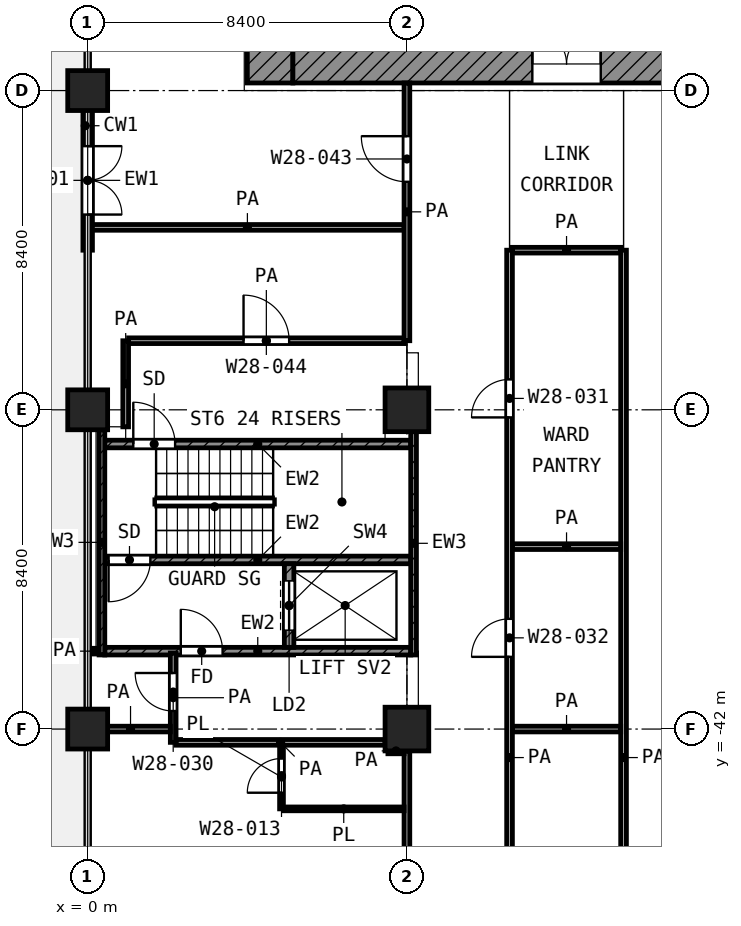
"""IFC4 building model, lengths in metres.
Left out: names, types, materials, properties, quantities, classifications, styles, units other than length and angle.
Written with IfcOpenShell. Run it as: python <this file> out.ifc"""

import sys

from ifc_helpers import new_model, si_unit, direction, frame, frame_2d, origin, origin_2d, place, context, subcontext, project, spatial, rectangle, extrude, element, fill, save


model = new_model("IFC4")
c1 = context("Model", 3, precision=1e-05, world=origin(), true_north=direction((0.0, 1.0)))
c2 = subcontext(c1, "Body", "Model", "MODEL_VIEW")
j1 = project(units=[si_unit("LENGTHUNIT", "METRE"), si_unit("PLANEANGLEUNIT", "RADIAN")], contexts=[c1])
p1 = place(None, origin())
s1 = spatial("IfcSite", under=j1, at=p1, CompositionType="ELEMENT")
p2 = place(p1, origin())
s2 = spatial("IfcBuilding", under=s1, at=p2, CompositionType="ELEMENT")
p3 = place(p2, frame((0.0, 0.0, 145.0)))
s3 = spatial("IfcBuildingStorey", under=s2, at=p3, CompositionType="ELEMENT", Elevation=145.0)
for number, where, z_axis, x_axis in (
    (1, (0.0, -25.2, 0.0), (0.0, 0.0, 1.0), (1.0, 0.0, 0.0)),
    (2, (0.0, -33.6, 0.0), (0.0, 0.0, 1.0), (1.0, 0.0, 0.0)),
):
    element("IfcColumn", number, at=place(p3, frame(where, z_axis=z_axis, x_axis=x_axis)), inside=s3, PredefinedType="COLUMN", context=c2, shape_type="SweptSolid", body=[
        extrude(rectangle(XDim=1.05, YDim=1.05, at=origin_2d()), origin(), (0.0, 0.0, 1.0), 4.2),
    ])
p4 = place(p3, frame((8.4, -33.6, 0.0), z_axis=(0.0, 0.0, 1.0), x_axis=(1.0, 0.0, 0.0)))
e3 = element("IfcColumn", 3, at=p4, inside=s3, PredefinedType="COLUMN", context=c2, shape_type="SweptSolid", body=[
    extrude(rectangle(XDim=1.15, YDim=1.15, at=origin_2d()), origin(), (0.0, 0.0, 1.0), 4.2),
])
p5 = place(p3, frame((0.0, -42.0, 0.0), z_axis=(0.0, 0.0, 1.0), x_axis=(1.0, 0.0, 0.0)))
e4 = element("IfcColumn", 4, at=p5, inside=s3, PredefinedType="COLUMN", context=c2, shape_type="SweptSolid", body=[
    extrude(rectangle(XDim=1.05, YDim=1.05, at=origin_2d()), origin(), (0.0, 0.0, 1.0), 4.2),
])
p6 = place(p3, frame((8.4, -42.0, 0.0), z_axis=(0.0, 0.0, 1.0), x_axis=(1.0, 0.0, 0.0)))
e5 = element("IfcColumn", 5, at=p6, inside=s3, PredefinedType="COLUMN", context=c2, shape_type="SweptSolid", body=[
    extrude(rectangle(XDim=1.15, YDim=1.15, at=origin_2d()), origin(), (0.0, 0.0, 1.0), 4.2),
])
p7 = place(p3, frame((0.0, -25.725, 0.0), z_axis=(0.0, 0.0, 1.0), x_axis=(0.0, -1.0, 0.0)))
e6 = element("IfcWall", 6, at=p7, inside=s3, PredefinedType="SOLIDWALL", context=c2, shape_type="SweptSolid", body=[
    extrude(rectangle(XDim=3.675, YDim=0.25, at=frame_2d((1.837, 0.0))), origin(), (0.0, 0.0, 1.0), 3.48),
])
p8 = place(p7, frame((0.938, 0.0, 0.0)))
e7 = element("IfcOpeningElement", 7, at=p8, cuts=e6, PredefinedType="OPENING", context=c2, shape_type="SweptSolid", body=[
    extrude(rectangle(XDim=1.8, YDim=2.1, at=frame_2d((0.9, 1.05))), frame((0.0, 0.135, 0.0), z_axis=(0.0, -1.0, 0.0), x_axis=(1.0, 0.0, 0.0)), (0.0, 0.0, 1.0), 0.27),
])
p9 = place(p3, frame((4.8, -25.0, 0.0), z_axis=(0.0, 0.0, 1.0), x_axis=(0.0, 1.0, 0.0)))
e8 = element("IfcWall", 8, at=p9, inside=s3, PredefinedType="SHEAR", context=c2, shape_type="SweptSolid", body=[
    extrude(rectangle(XDim=19.6, YDim=1.2, at=frame_2d((9.8, 0.0))), origin(), (0.0, 0.0, 1.0), 3.6),
])
p10 = place(p9, frame((11.45, 0.0, 0.0)))
e9 = element("IfcOpeningElement", 9, at=p10, cuts=e8, PredefinedType="OPENING", context=c2, shape_type="SweptSolid", body=[
    extrude(rectangle(XDim=1.1, YDim=2.1, at=frame_2d((0.55, 1.05))), frame((0.0, 0.61, 0.0), z_axis=(0.0, -1.0, 0.0), x_axis=(1.0, 0.0, 0.0)), (0.0, 0.0, 1.0), 1.22),
])
p11 = place(p9, frame((2.15, 0.0, 0.0)))
e10 = element("IfcOpeningElement", 10, at=p11, cuts=e8, PredefinedType="OPENING", context=c2, shape_type="SweptSolid", body=[
    extrude(rectangle(XDim=1.1, YDim=2.1, at=frame_2d((0.55, 1.05))), frame((0.0, 0.61, 0.0), z_axis=(0.0, -1.0, 0.0), x_axis=(1.0, 0.0, 0.0)), (0.0, 0.0, 1.0), 1.22),
])
p12 = place(p3, frame((5.4, -24.5, 0.0), z_axis=(0.0, 0.0, 1.0), x_axis=(1.0, 0.0, 0.0)))
e11 = element("IfcWall", 11, at=p12, inside=s3, PredefinedType="SHEAR", context=c2, shape_type="SweptSolid", body=[
    extrude(rectangle(XDim=18.6, YDim=1.0, at=frame_2d((9.3, 0.0))), origin(), (0.0, 0.0, 1.0), 3.6),
])
p13 = place(p12, frame((6.3, 0.0, 0.0)))
e12 = element("IfcOpeningElement", 12, at=p13, cuts=e11, PredefinedType="OPENING", context=c2, shape_type="SweptSolid", body=[
    extrude(rectangle(XDim=1.8, YDim=2.1, at=frame_2d((0.9, 1.05))), frame((0.0, 0.51, 0.0), z_axis=(0.0, -1.0, 0.0), x_axis=(1.0, 0.0, 0.0)), (0.0, 0.0, 1.0), 1.02),
])
p14 = place(p3, frame((0.375, -40.05, 0.0), z_axis=(0.0, 0.0, 1.0), x_axis=(0.0, 1.0, 0.0)))
e13 = element("IfcWall", 13, at=p14, inside=s3, PredefinedType="SHEAR", context=c2, shape_type="SweptSolid", body=[
    extrude(rectangle(XDim=5.925, YDim=0.15, at=frame_2d((2.962, 0.0))), origin(), (0.0, 0.0, 1.0), 3.6),
])
p15 = place(p3, frame((8.575, -40.05, 0.0), z_axis=(0.0, 0.0, 1.0), x_axis=(0.0, 1.0, 0.0)))
e14 = element("IfcWall", 14, at=p15, inside=s3, PredefinedType="SHEAR", context=c2, shape_type="SweptSolid", body=[
    extrude(rectangle(XDim=5.875, YDim=0.15, at=frame_2d((2.938, 0.0))), origin(), (0.0, 0.0, 1.0), 3.6),
])
p16 = place(p3, frame((0.45, -34.5, 0.0), z_axis=(0.0, 0.0, 1.0), x_axis=(1.0, 0.0, 0.0)))
e15 = element("IfcWall", 15, at=p16, inside=s3, PredefinedType="SHEAR", context=c2, shape_type="SweptSolid", body=[
    extrude(rectangle(XDim=8.05, YDim=0.2, at=frame_2d((4.025, 0.0))), origin(), (0.0, 0.0, 1.0), 3.6),
])
p17 = place(p16, frame((0.75, 0.0, 0.0)))
e16 = element("IfcOpeningElement", 16, at=p17, cuts=e15, PredefinedType="OPENING", context=c2, shape_type="SweptSolid", body=[
    extrude(rectangle(XDim=1.1, YDim=2.1, at=frame_2d((0.55, 1.05))), frame((0.0, 0.11, 0.0), z_axis=(0.0, -1.0, 0.0), x_axis=(1.0, 0.0, 0.0)), (0.0, 0.0, 1.0), 0.22),
])
p18 = place(p3, frame((0.45, -37.55, 0.0), z_axis=(0.0, 0.0, 1.0), x_axis=(1.0, 0.0, 0.0)))
e17 = element("IfcWall", 17, at=p18, inside=s3, PredefinedType="SHEAR", context=c2, shape_type="SweptSolid", body=[
    extrude(rectangle(XDim=8.05, YDim=0.2, at=frame_2d((4.025, 0.0))), origin(), (0.0, 0.0, 1.0), 3.6),
])
p19 = place(p18, frame((0.1, 0.0, 0.0)))
e18 = element("IfcOpeningElement", 18, at=p19, cuts=e17, PredefinedType="OPENING", context=c2, shape_type="SweptSolid", body=[
    extrude(rectangle(XDim=1.1, YDim=2.1, at=frame_2d((0.55, 1.05))), frame((0.0, 0.11, 0.0), z_axis=(0.0, -1.0, 0.0), x_axis=(1.0, 0.0, 0.0)), (0.0, 0.0, 1.0), 0.22),
])
p20 = place(p3, frame((0.45, -39.95, 0.0), z_axis=(0.0, 0.0, 1.0), x_axis=(1.0, 0.0, 0.0)))
e19 = element("IfcWall", 19, at=p20, inside=s3, PredefinedType="SHEAR", context=c2, shape_type="SweptSolid", body=[
    extrude(rectangle(XDim=8.05, YDim=0.2, at=frame_2d((4.025, 0.0))), origin(), (0.0, 0.0, 1.0), 3.6),
])
p21 = place(p20, frame((2.0, 0.0, 0.0)))
e20 = element("IfcOpeningElement", 20, at=p21, cuts=e19, PredefinedType="OPENING", context=c2, shape_type="SweptSolid", body=[
    extrude(rectangle(XDim=1.1, YDim=2.1, at=frame_2d((0.55, 1.05))), frame((0.0, 0.11, 0.0), z_axis=(0.0, -1.0, 0.0), x_axis=(1.0, 0.0, 0.0)), (0.0, 0.0, 1.0), 0.22),
])
p22 = place(p3, frame((5.3, -39.85, 0.0), z_axis=(0.0, 0.0, 1.0), x_axis=(0.0, 1.0, 0.0)))
e21 = element("IfcWall", 21, at=p22, inside=s3, PredefinedType="SHEAR", context=c2, shape_type="SweptSolid", body=[
    extrude(rectangle(XDim=2.2, YDim=0.25, at=frame_2d((1.1, 0.0))), origin(), (0.0, 0.0, 1.0), 3.6),
])
p23 = place(p22, frame((0.45, 0.0, 0.0)))
e22 = element("IfcOpeningElement", 22, at=p23, cuts=e21, PredefinedType="OPENING", context=c2, shape_type="SweptSolid", body=[
    extrude(rectangle(XDim=1.3, YDim=2.1, at=frame_2d((0.65, 1.05))), frame((0.0, 0.135, 0.0), z_axis=(0.0, -1.0, 0.0), x_axis=(1.0, 0.0, 0.0)), (0.0, 0.0, 1.0), 0.27),
])
p24 = place(p3, frame((5.15, -44.1, 0.0), z_axis=(0.0, 0.0, 1.0), x_axis=(1.0, 0.0, 0.0)))
e23 = element("IfcWall", 23, at=p24, inside=s3, PredefinedType="PARTITIONING", context=c2, shape_type="SweptSolid", body=[
    extrude(rectangle(XDim=3.175, YDim=0.1, at=frame_2d((1.587, 0.0))), origin(), (0.0, 0.0, 1.0), 3.6),
])
p25 = place(p3, frame((5.1, -44.1, 0.0), z_axis=(0.0, 0.0, 1.0), x_axis=(0.0, 1.0, 0.0)))
e24 = element("IfcWall", 24, at=p25, inside=s3, PredefinedType="PARTITIONING", context=c2, shape_type="SweptSolid", body=[
    extrude(rectangle(XDim=1.675, YDim=0.1, at=frame_2d((0.837, 0.0))), origin(), (0.0, 0.0, 1.0), 3.6),
])
p26 = place(p25, frame((0.425, 0.0, 0.0)))
e25 = element("IfcOpeningElement", 25, at=p26, cuts=e24, PredefinedType="OPENING", context=c2, shape_type="SweptSolid", body=[
    extrude(rectangle(XDim=0.9, YDim=2.1, at=frame_2d((0.45, 1.05))), frame((0.0, 0.06, 0.0), z_axis=(0.0, -1.0, 0.0), x_axis=(1.0, 0.0, 0.0)), (0.0, 0.0, 1.0), 0.12),
])
p27 = place(p3, frame((7.9, -42.575, 0.0), z_axis=(0.0, 0.0, 1.0), x_axis=(1.0, 0.0, 0.0)))
e26 = element("IfcWall", 26, at=p27, inside=s3, PredefinedType="PARTITIONING", context=c2, shape_type="SweptSolid", body=[
    extrude(rectangle(XDim=0.425, YDim=0.15, at=frame_2d((0.212, 0.0))), origin(), (0.0, 0.0, 1.0), 3.6),
])
p28 = place(p3, frame((2.325, -42.35, 0.0), z_axis=(0.0, 0.0, 1.0), x_axis=(1.0, 0.0, 0.0)))
e27 = element("IfcWall", 27, at=p28, inside=s3, PredefinedType="PARTITIONING", context=c2, shape_type="SweptSolid", body=[
    extrude(rectangle(XDim=5.498, YDim=0.15, at=frame_2d((2.749, 0.0))), origin(), (0.0, 0.0, 1.0), 3.6),
])
p29 = place(p3, frame((0.08, -42.0, 0.0), z_axis=(0.0, 0.0, 1.0), x_axis=(1.0, 0.0, 0.0)))
e28 = element("IfcWall", 28, at=p29, inside=s3, PredefinedType="PARTITIONING", context=c2, shape_type="SweptSolid", body=[
    extrude(rectangle(XDim=2.095, YDim=0.15, at=frame_2d((1.047, 0.0))), origin(), (0.0, 0.0, 1.0), 3.6),
])
p30 = place(p3, frame((11.175, -42.0, 0.0), z_axis=(0.0, 0.0, 1.0), x_axis=(1.0, 0.0, 0.0)))
e29 = element("IfcWall", 29, at=p30, inside=s3, PredefinedType="PARTITIONING", context=c2, shape_type="SweptSolid", body=[
    extrude(rectangle(XDim=2.85, YDim=0.15, at=frame_2d((1.425, 0.0))), origin(), (0.0, 0.0, 1.0), 3.6),
])
p31 = place(p3, frame((0.08, -39.95, 0.0), z_axis=(0.0, 0.0, 1.0), x_axis=(1.0, 0.0, 0.0)))
e30 = element("IfcWall", 30, at=p31, inside=s3, PredefinedType="PARTITIONING", context=c2, shape_type="SweptSolid", body=[
    extrude(rectangle(XDim=0.19, YDim=0.15, at=frame_2d((0.095, 0.0))), origin(), (0.0, 0.0, 1.0), 3.6),
])
p32 = place(p3, frame((11.175, -37.2, 0.0), z_axis=(0.0, 0.0, 1.0), x_axis=(1.0, 0.0, 0.0)))
e31 = element("IfcWall", 31, at=p32, inside=s3, PredefinedType="PARTITIONING", context=c2, shape_type="SweptSolid", body=[
    extrude(rectangle(XDim=2.85, YDim=0.15, at=frame_2d((1.425, 0.0))), origin(), (0.0, 0.0, 1.0), 3.6),
])
p33 = place(p3, frame((1.077, -31.782, 0.0), z_axis=(0.0, 0.0, 1.0), x_axis=(1.0, 0.0, 0.0)))
e32 = element("IfcWall", 32, at=p33, inside=s3, PredefinedType="PARTITIONING", context=c2, shape_type="SweptSolid", body=[
    extrude(rectangle(XDim=7.248, YDim=0.15, at=frame_2d((3.624, 0.0))), origin(), (0.0, 0.0, 1.0), 3.6),
])
p34 = place(p33, frame((3.024, 0.0, 0.0)))
e33 = element("IfcOpeningElement", 33, at=p34, cuts=e32, PredefinedType="OPENING", context=c2, shape_type="SweptSolid", body=[
    extrude(rectangle(XDim=1.2, YDim=2.1, at=frame_2d((0.6, 1.05))), frame((0.0, 0.085, 0.0), z_axis=(0.0, -1.0, 0.0), x_axis=(1.0, 0.0, 0.0)), (0.0, 0.0, 1.0), 0.17),
])
p35 = place(p3, frame((11.175, -29.4, 0.0), z_axis=(0.0, 0.0, 1.0), x_axis=(1.0, 0.0, 0.0)))
e34 = element("IfcWall", 34, at=p35, inside=s3, PredefinedType="PARTITIONING", context=c2, shape_type="SweptSolid", body=[
    extrude(rectangle(XDim=2.85, YDim=0.15, at=frame_2d((1.425, 0.0))), origin(), (0.0, 0.0, 1.0), 3.6),
])
p36 = place(p3, frame((0.08, -28.8, 0.0), z_axis=(0.0, 0.0, 1.0), x_axis=(1.0, 0.0, 0.0)))
e35 = element("IfcWall", 35, at=p36, inside=s3, PredefinedType="PARTITIONING", context=c2, shape_type="SweptSolid", body=[
    extrude(rectangle(XDim=8.245, YDim=0.15, at=frame_2d((4.123, 0.0))), origin(), (0.0, 0.0, 1.0), 3.6),
])
p37 = place(p3, frame((1.0, -34.048, 0.0), z_axis=(0.0, 0.0, 1.0), x_axis=(0.0, 1.0, 0.0)))
e36 = element("IfcWall", 36, at=p37, inside=s3, PredefinedType="PARTITIONING", context=c2, shape_type="SweptSolid", body=[
    extrude(rectangle(XDim=2.265, YDim=0.15, at=frame_2d((1.133, 0.0))), origin(), (0.0, 0.0, 1.0), 3.6),
])
p38 = place(p3, frame((2.25, -42.35, 0.0), z_axis=(0.0, 0.0, 1.0), x_axis=(0.0, 1.0, 0.0)))
e37 = element("IfcWall", 37, at=p38, inside=s3, PredefinedType="PARTITIONING", context=c2, shape_type="SweptSolid", body=[
    extrude(rectangle(XDim=2.35, YDim=0.15, at=frame_2d((1.175, 0.0))), origin(), (0.0, 0.0, 1.0), 3.6),
])
p39 = place(p38, frame((0.825, 0.0, 0.0)))
e38 = element("IfcOpeningElement", 38, at=p39, cuts=e37, PredefinedType="OPENING", context=c2, shape_type="SweptSolid", body=[
    extrude(rectangle(XDim=1.0, YDim=2.1, at=frame_2d((0.5, 1.05))), frame((0.0, 0.085, 0.0), z_axis=(0.0, -1.0, 0.0), x_axis=(1.0, 0.0, 0.0)), (0.0, 0.0, 1.0), 0.17),
])
p40 = place(p3, frame((8.4, -58.72, 0.0), z_axis=(0.0, 0.0, 1.0), x_axis=(0.0, 1.0, 0.0)))
e39 = element("IfcWall", 39, at=p40, inside=s3, PredefinedType="PARTITIONING", context=c2, shape_type="SweptSolid", body=[
    extrude(rectangle(XDim=16.145, YDim=0.15, at=frame_2d((8.073, 0.0))), origin(), (0.0, 0.0, 1.0), 2.7),
])
p41 = place(p40, frame((9.82, 0.0, 0.0)))
e40 = element("IfcOpeningElement", 40, at=p41, cuts=e39, PredefinedType="OPENING", context=c2, shape_type="SweptSolid", body=[
    extrude(rectangle(XDim=1.2, YDim=2.1, at=frame_2d((0.6, 1.05))), frame((0.0, 0.085, 0.0), z_axis=(0.0, -1.0, 0.0), x_axis=(1.0, 0.0, 0.0)), (0.0, 0.0, 1.0), 0.17),
])
p42 = place(p40, frame((11.92, 0.0, 0.0)))
e41 = element("IfcOpeningElement", 41, at=p42, cuts=e39, PredefinedType="OPENING", context=c2, shape_type="SweptSolid", body=[
    extrude(rectangle(XDim=1.2, YDim=2.1, at=frame_2d((0.6, 1.05))), frame((0.0, 0.085, 0.0), z_axis=(0.0, -1.0, 0.0), x_axis=(1.0, 0.0, 0.0)), (0.0, 0.0, 1.0), 0.17),
])
p43 = place(p40, frame((3.37, 0.0, 0.0)))
e42 = element("IfcOpeningElement", 42, at=p43, cuts=e39, PredefinedType="OPENING", context=c2, shape_type="SweptSolid", body=[
    extrude(rectangle(XDim=1.5, YDim=2.1, at=frame_2d((0.75, 1.05))), frame((0.0, 0.085, 0.0), z_axis=(0.0, -1.0, 0.0), x_axis=(1.0, 0.0, 0.0)), (0.0, 0.0, 1.0), 0.17),
])
p44 = place(p3, frame((8.4, -31.782, 0.0), z_axis=(0.0, 0.0, 1.0), x_axis=(0.0, 1.0, 0.0)))
e43 = element("IfcWall", 43, at=p44, inside=s3, PredefinedType="PARTITIONING", context=c2, shape_type="SweptSolid", body=[
    extrude(rectangle(XDim=6.782, YDim=0.15, at=frame_2d((3.391, 0.0))), origin(), (0.0, 0.0, 1.0), 3.6),
])
p45 = place(p44, frame((4.182, 0.0, 0.0)))
e44 = element("IfcOpeningElement", 44, at=p45, cuts=e43, PredefinedType="OPENING", context=c2, shape_type="SweptSolid", body=[
    extrude(rectangle(XDim=1.2, YDim=2.1, at=frame_2d((0.6, 1.05))), frame((0.0, 0.085, 0.0), z_axis=(0.0, -1.0, 0.0), x_axis=(1.0, 0.0, 0.0)), (0.0, 0.0, 1.0), 0.17),
])
p46 = place(p3, frame((11.1, -56.1, 0.0), z_axis=(0.0, 0.0, 1.0), x_axis=(0.0, 1.0, 0.0)))
e45 = element("IfcWall", 45, at=p46, inside=s3, PredefinedType="PARTITIONING", context=c2, shape_type="SweptSolid", body=[
    extrude(rectangle(XDim=26.7, YDim=0.15, at=frame_2d((13.35, 0.0))), origin(), (0.0, 0.0, 1.0), 3.6),
])
p47 = place(p46, frame((22.3, 0.0, 0.0)))
e46 = element("IfcOpeningElement", 46, at=p47, cuts=e45, PredefinedType="OPENING", context=c2, shape_type="SweptSolid", body=[
    extrude(rectangle(XDim=1.0, YDim=2.1, at=frame_2d((0.5, 1.05))), frame((0.0, 0.085, 0.0), z_axis=(0.0, -1.0, 0.0), x_axis=(1.0, 0.0, 0.0)), (0.0, 0.0, 1.0), 0.17),
])
p48 = place(p46, frame((16.0, 0.0, 0.0)))
e47 = element("IfcOpeningElement", 47, at=p48, cuts=e45, PredefinedType="OPENING", context=c2, shape_type="SweptSolid", body=[
    extrude(rectangle(XDim=1.0, YDim=2.1, at=frame_2d((0.5, 1.05))), frame((0.0, 0.085, 0.0), z_axis=(0.0, -1.0, 0.0), x_axis=(1.0, 0.0, 0.0)), (0.0, 0.0, 1.0), 0.17),
])
p49 = place(p46, frame((6.45, 0.0, 0.0)))
e48 = element("IfcOpeningElement", 48, at=p49, cuts=e45, PredefinedType="OPENING", context=c2, shape_type="SweptSolid", body=[
    extrude(rectangle(XDim=1.2, YDim=2.1, at=frame_2d((0.6, 1.05))), frame((0.0, 0.085, 0.0), z_axis=(0.0, -1.0, 0.0), x_axis=(1.0, 0.0, 0.0)), (0.0, 0.0, 1.0), 0.17),
])
p50 = place(p3, frame((14.1, -56.1, 0.0), z_axis=(0.0, 0.0, 1.0), x_axis=(0.0, 1.0, 0.0)))
e49 = element("IfcWall", 49, at=p50, inside=s3, PredefinedType="PARTITIONING", context=c2, shape_type="SweptSolid", body=[
    extrude(rectangle(XDim=26.7, YDim=0.15, at=frame_2d((13.35, 0.0))), origin(), (0.0, 0.0, 1.0), 3.6),
])
p51 = place(p8, origin())
e50 = element("IfcDoor", 50, at=p51, inside=s3, OperationType="DOUBLE_DOOR_SINGLE_SWING", PredefinedType="DOOR", context=c2, shape_type="SweptSolid", body=[
    extrude(rectangle(XDim=1.8, YDim=2.1, at=frame_2d((0.9, 1.05))), frame((0.0, 0.025, 0.0), z_axis=(0.0, -1.0, 0.0), x_axis=(1.0, 0.0, 0.0)), (0.0, 0.0, 1.0), 0.05),
])
fill(e7, e50)
p52 = place(p13, origin())
e51 = element("IfcDoor", 51, at=p52, inside=s3, OperationType="DOUBLE_DOOR_SINGLE_SWING", PredefinedType="DOOR", context=c2, shape_type="SweptSolid", body=[
    extrude(rectangle(XDim=1.8, YDim=2.1, at=frame_2d((0.9, 1.05))), frame((0.0, 0.025, 0.0), z_axis=(0.0, -1.0, 0.0), x_axis=(1.0, 0.0, 0.0)), (0.0, 0.0, 1.0), 0.05),
])
fill(e12, e51)
p53 = place(p17, origin())
e52 = element("IfcDoor", 52, at=p53, inside=s3, OperationType="SINGLE_SWING_LEFT", PredefinedType="DOOR", context=c2, shape_type="SweptSolid", body=[
    extrude(rectangle(XDim=1.1, YDim=2.1, at=frame_2d((0.55, 1.05))), frame((0.0, 0.025, 0.0), z_axis=(0.0, -1.0, 0.0), x_axis=(1.0, 0.0, 0.0)), (0.0, 0.0, 1.0), 0.05),
])
fill(e16, e52)
p54 = place(p19, frame((1.1, 0.0, 0.0), z_axis=(0.0, 0.0, 1.0), x_axis=(-1.0, 0.0, 0.0)))
e53 = element("IfcDoor", 53, at=p54, inside=s3, OperationType="SINGLE_SWING_LEFT", PredefinedType="DOOR", context=c2, shape_type="SweptSolid", body=[
    extrude(rectangle(XDim=1.1, YDim=2.1, at=frame_2d((0.55, 1.05))), frame((0.0, 0.025, 0.0), z_axis=(0.0, -1.0, 0.0), x_axis=(1.0, 0.0, 0.0)), (0.0, 0.0, 1.0), 0.05),
])
fill(e18, e53)
p55 = place(p23, origin())
e54 = element("IfcDoor", 54, at=p55, inside=s3, OperationType="DOUBLE_DOOR_SLIDING", PredefinedType="DOOR", context=c2, shape_type="SweptSolid", body=[
    extrude(rectangle(XDim=1.3, YDim=2.1, at=frame_2d((0.65, 1.05))), frame((0.0, 0.025, 0.0), z_axis=(0.0, -1.0, 0.0), x_axis=(1.0, 0.0, 0.0)), (0.0, 0.0, 1.0), 0.05),
])
fill(e22, e54)
p56 = place(p21, origin())
e55 = element("IfcDoor", 55, at=p56, inside=s3, OperationType="SINGLE_SWING_LEFT", PredefinedType="DOOR", context=c2, shape_type="SweptSolid", body=[
    extrude(rectangle(XDim=1.1, YDim=2.1, at=frame_2d((0.55, 1.05))), frame((0.0, 0.025, 0.0), z_axis=(0.0, -1.0, 0.0), x_axis=(1.0, 0.0, 0.0)), (0.0, 0.0, 1.0), 0.05),
])
fill(e20, e55)
p57 = place(p45, origin())
e56 = element("IfcDoor", 56, at=p57, inside=s3, OperationType="SINGLE_SWING_RIGHT", PredefinedType="DOOR", context=c2, shape_type="SweptSolid", body=[
    extrude(rectangle(XDim=1.2, YDim=2.1, at=frame_2d((0.6, 1.05))), frame((0.0, 0.025, 0.0), z_axis=(0.0, -1.0, 0.0), x_axis=(1.0, 0.0, 0.0)), (0.0, 0.0, 1.0), 0.05),
])
fill(e44, e56)
p58 = place(p34, origin())
e57 = element("IfcDoor", 57, at=p58, inside=s3, OperationType="SINGLE_SWING_LEFT", PredefinedType="DOOR", context=c2, shape_type="SweptSolid", body=[
    extrude(rectangle(XDim=1.2, YDim=2.1, at=frame_2d((0.6, 1.05))), frame((0.0, 0.025, 0.0), z_axis=(0.0, -1.0, 0.0), x_axis=(1.0, 0.0, 0.0)), (0.0, 0.0, 1.0), 0.05),
])
fill(e33, e57)
p59 = place(p39, origin())
e58 = element("IfcDoor", 58, at=p59, inside=s3, OperationType="SINGLE_SWING_RIGHT", PredefinedType="DOOR", context=c2, shape_type="SweptSolid", body=[
    extrude(rectangle(XDim=1.0, YDim=2.1, at=frame_2d((0.5, 1.05))), frame((0.0, 0.025, 0.0), z_axis=(0.0, -1.0, 0.0), x_axis=(1.0, 0.0, 0.0)), (0.0, 0.0, 1.0), 0.05),
])
fill(e38, e58)
p60 = place(p26, origin())
e59 = element("IfcDoor", 59, at=p60, inside=s3, OperationType="SINGLE_SWING_LEFT", PredefinedType="DOOR", context=c2, shape_type="SweptSolid", body=[
    extrude(rectangle(XDim=0.9, YDim=2.1, at=frame_2d((0.45, 1.05))), frame((0.0, 0.025, 0.0), z_axis=(0.0, -1.0, 0.0), x_axis=(1.0, 0.0, 0.0)), (0.0, 0.0, 1.0), 0.05),
])
fill(e25, e59)
p61 = place(p47, origin())
e60 = element("IfcDoor", 60, at=p61, inside=s3, OperationType="SINGLE_SWING_LEFT", PredefinedType="DOOR", context=c2, shape_type="SweptSolid", body=[
    extrude(rectangle(XDim=1.0, YDim=2.1, at=frame_2d((0.5, 1.05))), frame((0.0, 0.025, 0.0), z_axis=(0.0, -1.0, 0.0), x_axis=(1.0, 0.0, 0.0)), (0.0, 0.0, 1.0), 0.05),
])
fill(e46, e60)
p62 = place(p48, origin())
e61 = element("IfcDoor", 61, at=p62, inside=s3, OperationType="SINGLE_SWING_LEFT", PredefinedType="DOOR", context=c2, shape_type="SweptSolid", body=[
    extrude(rectangle(XDim=1.0, YDim=2.1, at=frame_2d((0.5, 1.05))), frame((0.0, 0.025, 0.0), z_axis=(0.0, -1.0, 0.0), x_axis=(1.0, 0.0, 0.0)), (0.0, 0.0, 1.0), 0.05),
])
fill(e47, e61)
save(model, sys.argv[1])
